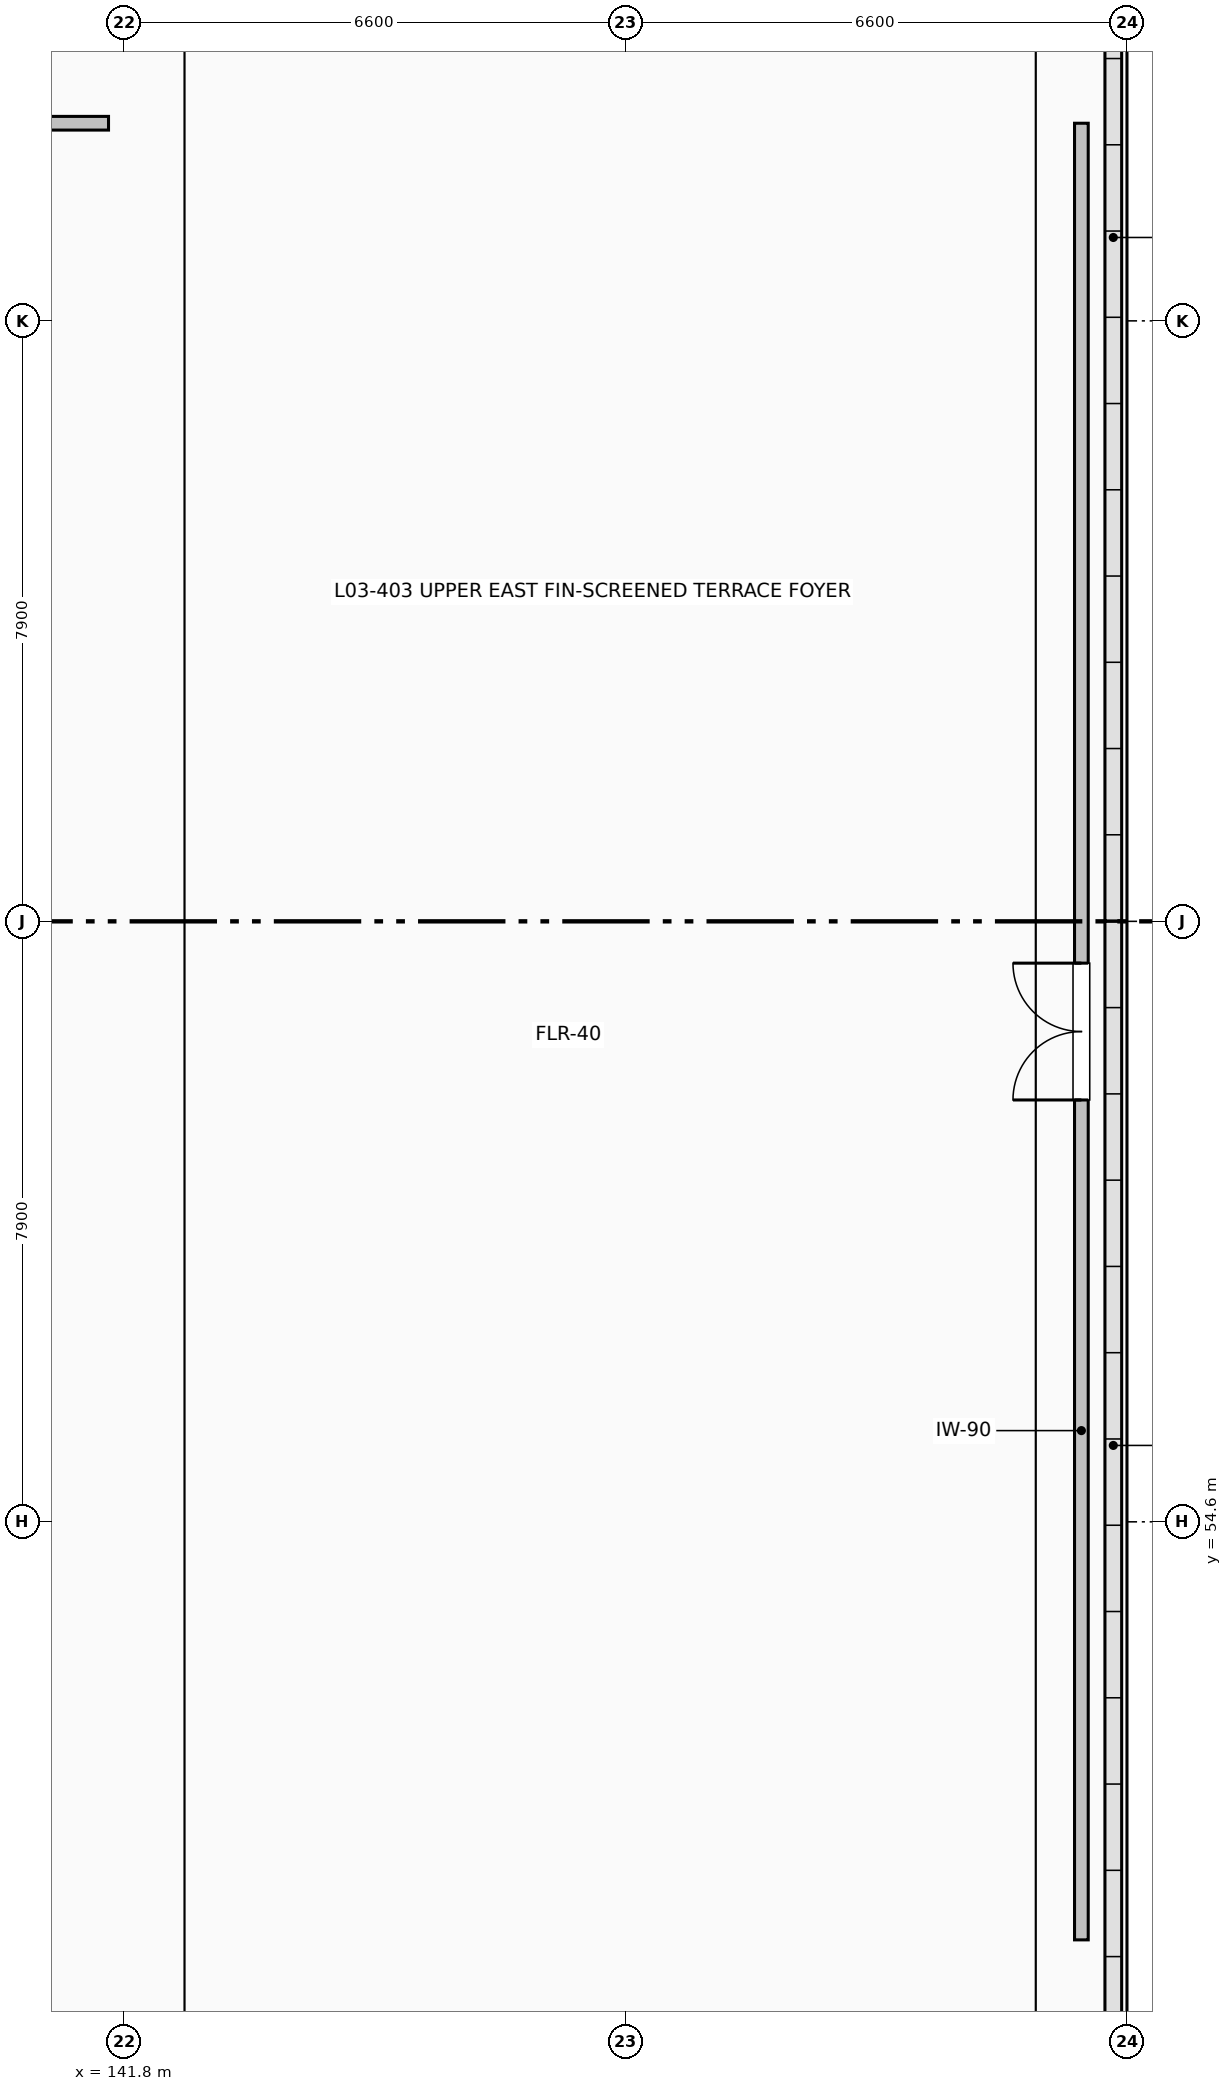
"""IFC4 building model, lengths in metres.
Left out: names, types, materials, properties, quantities, classifications, styles, units other than length and angle.
Written with IfcOpenShell. Run it as: python <this file> out.ifc"""

import sys

from ifc_helpers import new_model, si_unit, direction, frame, frame_2d, origin, place, context, subcontext, project, spatial, rectangle, extrude, element, fill, save


model = new_model("IFC4")
c1 = context("Model", 3, precision=1e-05, world=origin(), true_north=direction((0.0, 1.0)))
c2 = subcontext(c1, "Body", "Model", "MODEL_VIEW")
j1 = project(units=[si_unit("LENGTHUNIT", "METRE"), si_unit("PLANEANGLEUNIT", "RADIAN")], contexts=[c1])
p1 = place(None, origin())
s1 = spatial("IfcSite", under=j1, at=p1, CompositionType="ELEMENT")
p2 = place(p1, origin())
s2 = spatial("IfcBuilding", under=s1, at=p2, CompositionType="ELEMENT")
p3 = place(p2, frame((0.0, 0.0, 15.0)))
s3 = spatial("IfcBuildingStorey", under=s2, at=p3, CompositionType="ELEMENT", Elevation=15.0)
p4 = place(p3, frame((111.0, 73.0, 0.0), z_axis=(0.0, 0.0, 1.0), x_axis=(1.0, 0.0, 0.0)))
e1 = element("IfcWall", 1, at=p4, inside=s3, PredefinedType="PARTITIONING", context=c2, shape_type="SweptSolid", body=[
    extrude(rectangle(XDim=30.6, YDim=0.18, at=frame_2d((15.3, 0.0))), origin(), (0.0, 0.0, 1.0), 4.192),
])
p5 = place(p4, frame((14.2, 0.0, 0.0)))
e2 = element("IfcOpeningElement", 2, at=p5, cuts=e1, PredefinedType="OPENING", context=c2, shape_type="SweptSolid", body=[
    extrude(rectangle(XDim=2.2, YDim=2.32, at=frame_2d((1.1, 1.16))), frame((0.0, 0.1, 0.0), z_axis=(0.0, -1.0, 0.0), x_axis=(1.0, 0.0, 0.0)), (0.0, 0.0, 1.0), 0.2),
])
p6 = place(p3, frame((154.4, 49.1, 0.0), z_axis=(0.0, 0.0, 1.0), x_axis=(0.0, 1.0, 0.0)))
e3 = element("IfcWall", 3, at=p6, inside=s3, PredefinedType="PARTITIONING", context=c2, shape_type="SweptSolid", body=[
    extrude(rectangle(XDim=23.9, YDim=0.18, at=frame_2d((11.95, 0.0))), origin(), (0.0, 0.0, 1.0), 4.192),
])
p7 = place(p6, frame((11.05, 0.0, 0.0)))
e4 = element("IfcOpeningElement", 4, at=p7, cuts=e3, PredefinedType="OPENING", context=c2, shape_type="SweptSolid", body=[
    extrude(rectangle(XDim=1.8, YDim=2.2, at=frame_2d((0.9, 1.1))), frame((0.0, 0.1, 0.0), z_axis=(0.0, -1.0, 0.0), x_axis=(1.0, 0.0, 0.0)), (0.0, 0.0, 1.0), 0.2),
])
p8 = place(p7, origin())
e5 = element("IfcDoor", 5, at=p8, inside=s3, OperationType="DOUBLE_DOOR_SINGLE_SWING", PredefinedType="DOOR", context=c2, shape_type="SweptSolid", body=[
    extrude(rectangle(XDim=1.8, YDim=2.2, at=frame_2d((0.9, 1.1))), frame((0.0, 0.025, 0.0), z_axis=(0.0, -1.0, 0.0), x_axis=(1.0, 0.0, 0.0)), (0.0, 0.0, 1.0), 0.05),
])
fill(e4, e5)
save(model, sys.argv[1])
